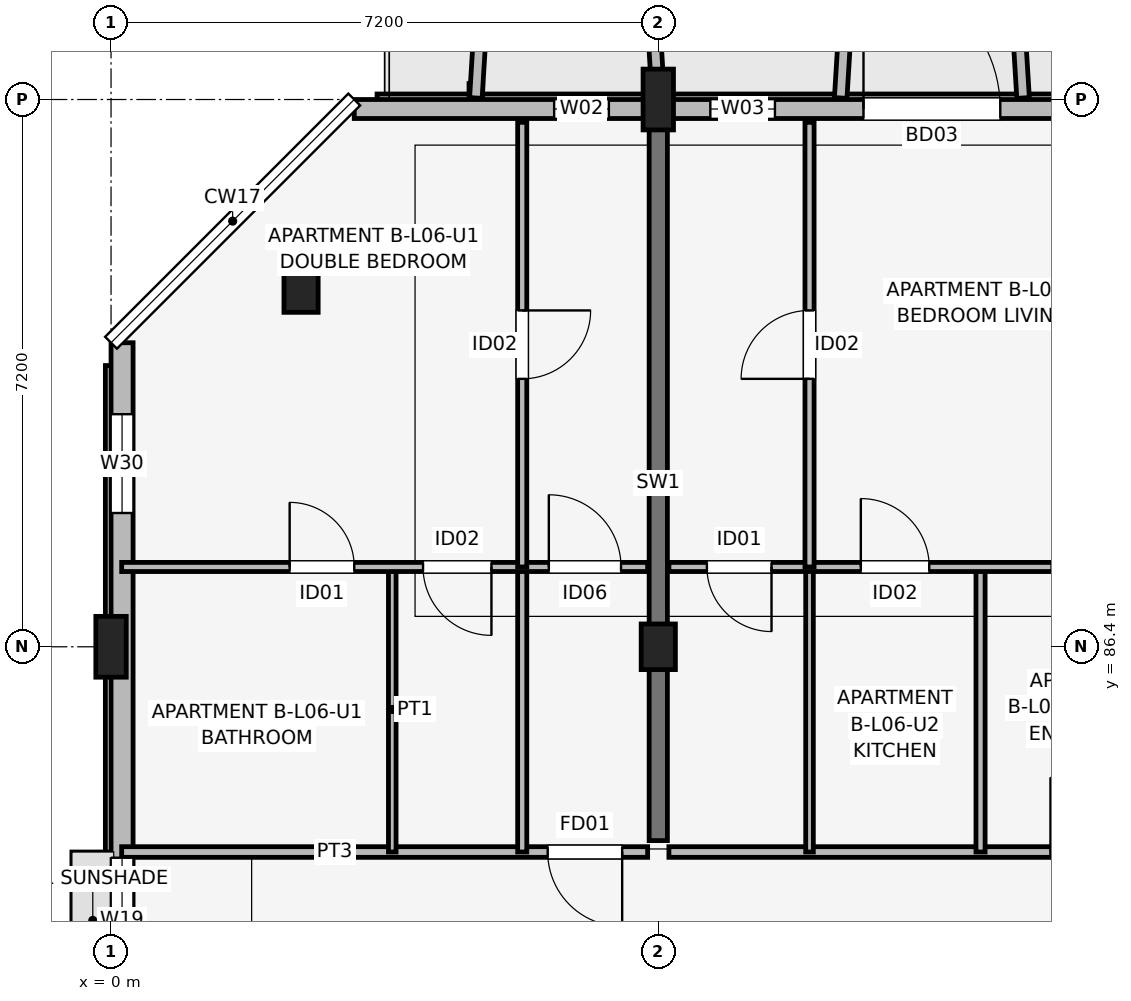
"""IFC4 building model, lengths in metres.
Left out: names, types, materials, properties, quantities, classifications, styles, units other than length and angle.
Written with IfcOpenShell. Run it as: python <this file> out.ifc"""

import sys

from ifc_helpers import new_model, si_unit, direction, frame, frame_2d, origin, origin_2d, place, context, subcontext, project, spatial, rectangle, extrude, element, fill, save


model = new_model("IFC4")
c1 = context("Model", 3, precision=1e-05, world=origin(), true_north=direction((0.0, 1.0)))
c2 = subcontext(c1, "Body", "Model", "MODEL_VIEW")
j1 = project(units=[si_unit("LENGTHUNIT", "METRE"), si_unit("PLANEANGLEUNIT", "RADIAN")], contexts=[c1])
p1 = place(None, origin())
s1 = spatial("IfcSite", under=j1, at=p1, CompositionType="ELEMENT")
p2 = place(p1, origin())
s2 = spatial("IfcBuilding", under=s1, at=p2, CompositionType="ELEMENT")
p3 = place(p2, frame((0.0, 0.0, 21.3)))
s3 = spatial("IfcBuildingStorey", under=s2, at=p3, CompositionType="ELEMENT", Elevation=21.3)
p4 = place(p3, frame((0.0, 86.4, 0.0), z_axis=(0.0, 0.0, 1.0), x_axis=(1.0, 0.0, 0.0)))
e1 = element("IfcColumn", 1, at=p4, inside=s3, PredefinedType="COLUMN", context=c2, shape_type="SweptSolid", body=[
    extrude(rectangle(XDim=0.4, YDim=0.8, at=origin_2d()), origin(), (0.0, 0.0, 1.0), 3.15),
])
for number, where, z_axis, x_axis in (
    (2, (2.5, 91.1, 0.0), (0.0, 0.0, 1.0), (1.0, 0.0, 0.0)),
    (3, (7.2, 86.4, 0.0), (0.0, 0.0, 1.0), (1.0, 0.0, 0.0)),
):
    element("IfcColumn", number, at=place(p3, frame(where, z_axis=z_axis, x_axis=x_axis)), inside=s3, PredefinedType="COLUMN", context=c2, shape_type="SweptSolid", body=[
        extrude(rectangle(XDim=0.45, YDim=0.6, at=origin_2d()), origin(), (0.0, 0.0, 1.0), 3.15),
    ])
p5 = place(p3, frame((7.2, 93.6, 0.0), z_axis=(0.0, 0.0, 1.0), x_axis=(1.0, 0.0, 0.0)))
e4 = element("IfcColumn", 4, at=p5, inside=s3, PredefinedType="COLUMN", context=c2, shape_type="SweptSolid", body=[
    extrude(rectangle(XDim=0.4, YDim=0.8, at=origin_2d()), origin(), (0.0, 0.0, 1.0), 3.15),
])
p6 = place(p3, frame((7.2, 83.85, 0.0), z_axis=(0.0, 0.0, 1.0), x_axis=(0.0, 1.0, 0.0)))
e5 = element("IfcWall", 5, at=p6, inside=s3, PredefinedType="SHEAR", context=c2, shape_type="SweptSolid", body=[
    extrude(rectangle(XDim=9.4, YDim=0.24, at=frame_2d((4.7, 0.0))), origin(), (0.0, 0.0, 1.0), 3.15),
])
p7 = place(p3, frame((32.8, 93.475, 0.0), z_axis=(0.0, 0.0, 1.0), x_axis=(-1.0, 0.0, 0.0)))
e6 = element("IfcWall", 6, at=p7, inside=s3, PredefinedType="SOLIDWALL", context=c2, shape_type="SweptSolid", body=[
    extrude(rectangle(XDim=29.6, YDim=0.25, at=frame_2d((14.8, 0.0))), origin(), (0.0, 0.0, 1.0), 2.43),
])
p8 = place(p7, frame((22.9, 0.0, 0.0), z_axis=(0.0, 0.0, 1.0), x_axis=(-1.0, 0.0, 0.0)))
e7 = element("IfcOpeningElement", 7, at=p8, cuts=e6, PredefinedType="OPENING", context=c2, shape_type="SweptSolid", body=[
    extrude(rectangle(XDim=1.8, YDim=2.15, at=frame_2d((0.9, 1.075))), frame((0.0, 0.135, 0.0), z_axis=(0.0, -1.0, 0.0), x_axis=(1.0, 0.0, 0.0)), (0.0, 0.0, 1.0), 0.27),
])
p9 = place(p7, frame((8.425, 0.0, 0.0), z_axis=(0.0, 0.0, 1.0), x_axis=(-1.0, 0.0, 0.0)))
e8 = element("IfcOpeningElement", 8, at=p9, cuts=e6, PredefinedType="OPENING", context=c2, shape_type="SweptSolid", body=[
    extrude(rectangle(XDim=1.65, YDim=2.15, at=frame_2d((0.825, 1.075))), frame((0.0, 0.135, 0.0), z_axis=(0.0, -1.0, 0.0), x_axis=(1.0, 0.0, 0.0)), (0.0, 0.0, 1.0), 0.27),
])
p10 = place(p7, frame((26.25, 0.0, 0.75)))
e9 = element("IfcOpeningElement", 9, at=p10, cuts=e6, PredefinedType="OPENING", context=c2, shape_type="SweptSolid", body=[
    extrude(rectangle(XDim=0.72, YDim=1.35, at=frame_2d((0.36, 0.675))), frame((0.0, 0.135, 0.0), z_axis=(0.0, -1.0, 0.0), x_axis=(1.0, 0.0, 0.0)), (0.0, 0.0, 1.0), 0.27),
])
p11 = place(p7, frame((24.065, 0.0, 0.75)))
e10 = element("IfcOpeningElement", 10, at=p11, cuts=e6, PredefinedType="OPENING", context=c2, shape_type="SweptSolid", body=[
    extrude(rectangle(XDim=0.85, YDim=1.4, at=frame_2d((0.425, 0.7))), frame((0.0, 0.135, 0.0), z_axis=(0.0, -1.0, 0.0), x_axis=(1.0, 0.0, 0.0)), (0.0, 0.0, 1.0), 0.27),
])
p12 = place(p7, frame((16.675, 0.0, 0.75)))
e11 = element("IfcOpeningElement", 11, at=p12, cuts=e6, PredefinedType="OPENING", context=c2, shape_type="SweptSolid", body=[
    extrude(rectangle(XDim=0.98, YDim=1.45, at=frame_2d((0.49, 0.725))), frame((0.0, 0.135, 0.0), z_axis=(0.0, -1.0, 0.0), x_axis=(1.0, 0.0, 0.0)), (0.0, 0.0, 1.0), 0.27),
])
p13 = place(p7, frame((13.725, 0.0, 0.67)))
e12 = element("IfcOpeningElement", 12, at=p13, cuts=e6, PredefinedType="OPENING", context=c2, shape_type="SweptSolid", body=[
    extrude(rectangle(XDim=2.15, YDim=1.65, at=frame_2d((1.075, 0.825))), frame((0.0, 0.135, 0.0), z_axis=(0.0, -1.0, 0.0), x_axis=(1.0, 0.0, 0.0)), (0.0, 0.0, 1.0), 0.27),
])
p14 = place(p7, frame((9.355, 0.0, 0.75)))
e13 = element("IfcOpeningElement", 13, at=p14, cuts=e6, PredefinedType="OPENING", context=c2, shape_type="SweptSolid", body=[
    extrude(rectangle(XDim=1.22, YDim=1.5, at=frame_2d((0.61, 0.75))), frame((0.0, 0.135, 0.0), z_axis=(0.0, -1.0, 0.0), x_axis=(1.0, 0.0, 0.0)), (0.0, 0.0, 1.0), 0.27),
])
p15 = place(p7, frame((1.89, 0.0, 0.7)))
e14 = element("IfcOpeningElement", 14, at=p15, cuts=e6, PredefinedType="OPENING", context=c2, shape_type="SweptSolid", body=[
    extrude(rectangle(XDim=1.58, YDim=1.6, at=frame_2d((0.79, 0.8))), frame((0.0, 0.135, 0.0), z_axis=(0.0, -1.0, 0.0), x_axis=(1.0, 0.0, 0.0)), (0.0, 0.0, 1.0), 0.27),
])
p16 = place(p3, frame((0.145, 90.4, 0.0), z_axis=(0.0, 0.0, 1.0), x_axis=(0.0, -1.0, 0.0)))
e15 = element("IfcWall", 15, at=p16, inside=s3, PredefinedType="SOLIDWALL", context=c2, shape_type="SweptSolid", body=[
    extrude(rectangle(XDim=15.2, YDim=0.29, at=frame_2d((7.6, 0.0))), origin(), (0.0, 0.0, 1.0), 2.43),
])
p17 = place(p16, frame((6.775, 0.0, 1.05)))
e16 = element("IfcOpeningElement", 16, at=p17, cuts=e15, PredefinedType="OPENING", context=c2, shape_type="SweptSolid", body=[
    extrude(rectangle(XDim=1.65, YDim=1.15, at=frame_2d((0.825, 0.575))), frame((0.0, 0.155, 0.0), z_axis=(0.0, -1.0, 0.0), x_axis=(1.0, 0.0, 0.0)), (0.0, 0.0, 1.0), 0.31),
])
p18 = place(p16, frame((0.94, 0.0, 0.75)))
e17 = element("IfcOpeningElement", 17, at=p18, cuts=e15, PredefinedType="OPENING", context=c2, shape_type="SweptSolid", body=[
    extrude(rectangle(XDim=1.3, YDim=1.55, at=frame_2d((0.65, 0.775))), frame((0.0, 0.155, 0.0), z_axis=(0.0, -1.0, 0.0), x_axis=(1.0, 0.0, 0.0)), (0.0, 0.0, 1.0), 0.31),
])
for number, where, z_axis, x_axis in (
    (18, (4.8, 93.62, 0.0), (0.0, 0.0, 1.0), (0.061, 0.998, 0.0)),
    (19, (7.2, 93.62, 0.0), (0.0, 0.0, 1.0), (-0.061, 0.998, 0.0)),
):
    element("IfcWall", number, at=place(p3, frame(where, z_axis=z_axis, x_axis=x_axis)), inside=s3, PredefinedType="ELEMENTEDWALL", context=c2, shape_type="SweptSolid", body=[
        extrude(rectangle(XDim=1.964, YDim=0.165, at=frame_2d((0.982, 0.0))), origin(), (0.0, 0.0, 1.0), 2.95),
    ])
for number, where, z_axis, x_axis in (
    (20, (9.6, 93.62, 0.0), (0.0, 0.0, 1.0), (0.061, 0.998, 0.0)),
    (21, (12.0, 93.62, 0.0), (0.0, 0.0, 1.0), (-0.061, 0.998, 0.0)),
):
    element("IfcWall", number, at=place(p3, frame(where, z_axis=z_axis, x_axis=x_axis)), inside=s3, PredefinedType="ELEMENTEDWALL", context=c2, shape_type="SweptSolid", body=[
        extrude(rectangle(XDim=1.964, YDim=0.165, at=frame_2d((0.982, 0.0))), origin(), (0.0, 0.0, 1.0), 2.48),
    ])
p19 = place(p3, frame((0.14, 83.7, 0.0), z_axis=(0.0, 0.0, 1.0), x_axis=(1.0, 0.0, 0.0)))
e22 = element("IfcWall", 22, at=p19, inside=s3, PredefinedType="PARTITIONING", context=c2, shape_type="SweptSolid", body=[
    extrude(rectangle(XDim=6.92, YDim=0.14, at=frame_2d((3.46, 0.0))), origin(), (0.0, 0.0, 1.0), 2.38),
])
p20 = place(p19, frame((6.585, 0.0, 0.0), z_axis=(0.0, 0.0, 1.0), x_axis=(-1.0, 0.0, 0.0)))
e23 = element("IfcOpeningElement", 23, at=p20, cuts=e22, PredefinedType="OPENING", context=c2, shape_type="SweptSolid", body=[
    extrude(rectangle(XDim=0.98, YDim=2.1, at=frame_2d((0.49, 1.05))), frame((0.0, 0.08, 0.0), z_axis=(0.0, -1.0, 0.0), x_axis=(1.0, 0.0, 0.0)), (0.0, 0.0, 1.0), 0.16),
])
p21 = place(p3, frame((3.7, 83.7, 0.0), z_axis=(0.0, 0.0, 1.0), x_axis=(0.0, 1.0, 0.0)))
e24 = element("IfcWall", 24, at=p21, inside=s3, PredefinedType="PARTITIONING", context=c2, shape_type="SweptSolid", body=[
    extrude(rectangle(XDim=3.75, YDim=0.1, at=frame_2d((1.875, 0.0))), origin(), (0.0, 0.0, 1.0), 2.38),
])
p22 = place(p3, frame((5.41, 83.7, 0.0), z_axis=(0.0, 0.0, 1.0), x_axis=(0.0, 1.0, 0.0)))
e25 = element("IfcWall", 25, at=p22, inside=s3, PredefinedType="PARTITIONING", context=c2, shape_type="SweptSolid", body=[
    extrude(rectangle(XDim=3.75, YDim=0.12, at=frame_2d((1.875, 0.0))), origin(), (0.0, 0.0, 1.0), 2.38),
])
p23 = place(p3, frame((0.14, 87.45, 0.0), z_axis=(0.0, 0.0, 1.0), x_axis=(1.0, 0.0, 0.0)))
e26 = element("IfcWall", 26, at=p23, inside=s3, PredefinedType="PARTITIONING", context=c2, shape_type="SweptSolid", body=[
    extrude(rectangle(XDim=6.92, YDim=0.12, at=frame_2d((3.46, 0.0))), origin(), (0.0, 0.0, 1.0), 2.38),
])
p24 = place(p23, frame((2.21, 0.0, 0.0)))
e27 = element("IfcOpeningElement", 27, at=p24, cuts=e26, PredefinedType="OPENING", context=c2, shape_type="SweptSolid", body=[
    extrude(rectangle(XDim=0.85, YDim=2.08, at=frame_2d((0.425, 1.04))), frame((0.0, 0.07, 0.0), z_axis=(0.0, -1.0, 0.0), x_axis=(1.0, 0.0, 0.0)), (0.0, 0.0, 1.0), 0.14),
])
p25 = place(p23, frame((4.865, 0.0, 0.0), z_axis=(0.0, 0.0, 1.0), x_axis=(-1.0, 0.0, 0.0)))
e28 = element("IfcOpeningElement", 28, at=p25, cuts=e26, PredefinedType="OPENING", context=c2, shape_type="SweptSolid", body=[
    extrude(rectangle(XDim=0.9, YDim=2.08, at=frame_2d((0.45, 1.04))), frame((0.0, 0.07, 0.0), z_axis=(0.0, -1.0, 0.0), x_axis=(1.0, 0.0, 0.0)), (0.0, 0.0, 1.0), 0.14),
])
p26 = place(p23, frame((5.62, 0.0, 0.0)))
e29 = element("IfcOpeningElement", 29, at=p26, cuts=e26, PredefinedType="OPENING", context=c2, shape_type="SweptSolid", body=[
    extrude(rectangle(XDim=0.95, YDim=2.08, at=frame_2d((0.475, 1.04))), frame((0.0, 0.07, 0.0), z_axis=(0.0, -1.0, 0.0), x_axis=(1.0, 0.0, 0.0)), (0.0, 0.0, 1.0), 0.14),
])
p27 = place(p3, frame((5.41, 87.45, 0.0), z_axis=(0.0, 0.0, 1.0), x_axis=(0.0, 1.0, 0.0)))
e30 = element("IfcWall", 30, at=p27, inside=s3, PredefinedType="PARTITIONING", context=c2, shape_type="SweptSolid", body=[
    extrude(rectangle(XDim=5.85, YDim=0.12, at=frame_2d((2.925, 0.0))), origin(), (0.0, 0.0, 1.0), 2.38),
])
p28 = place(p27, frame((3.375, 0.0, 0.0), z_axis=(0.0, 0.0, 1.0), x_axis=(-1.0, 0.0, 0.0)))
e31 = element("IfcOpeningElement", 31, at=p28, cuts=e30, PredefinedType="OPENING", context=c2, shape_type="SweptSolid", body=[
    extrude(rectangle(XDim=0.9, YDim=2.08, at=frame_2d((0.45, 1.04))), frame((0.0, 0.07, 0.0), z_axis=(0.0, -1.0, 0.0), x_axis=(1.0, 0.0, 0.0)), (0.0, 0.0, 1.0), 0.14),
])
p29 = place(p3, frame((7.34, 83.7, 0.0), z_axis=(0.0, 0.0, 1.0), x_axis=(1.0, 0.0, 0.0)))
e32 = element("IfcWall", 32, at=p29, inside=s3, PredefinedType="PARTITIONING", context=c2, shape_type="SweptSolid", body=[
    extrude(rectangle(XDim=6.92, YDim=0.14, at=frame_2d((3.46, 0.0))), origin(), (0.0, 0.0, 1.0), 2.38),
])
p30 = place(p29, frame((5.02, 0.0, 0.0)))
e33 = element("IfcOpeningElement", 33, at=p30, cuts=e32, PredefinedType="OPENING", context=c2, shape_type="SweptSolid", body=[
    extrude(rectangle(XDim=0.98, YDim=2.1, at=frame_2d((0.49, 1.05))), frame((0.0, 0.08, 0.0), z_axis=(0.0, -1.0, 0.0), x_axis=(1.0, 0.0, 0.0)), (0.0, 0.0, 1.0), 0.16),
])
p31 = place(p3, frame((9.19, 83.7, 0.0), z_axis=(0.0, 0.0, 1.0), x_axis=(0.0, 1.0, 0.0)))
e34 = element("IfcWall", 34, at=p31, inside=s3, PredefinedType="PARTITIONING", context=c2, shape_type="SweptSolid", body=[
    extrude(rectangle(XDim=3.75, YDim=0.1, at=frame_2d((1.875, 0.0))), origin(), (0.0, 0.0, 1.0), 2.38),
])
p32 = place(p3, frame((11.44, 83.7, 0.0), z_axis=(0.0, 0.0, 1.0), x_axis=(0.0, 1.0, 0.0)))
e35 = element("IfcWall", 35, at=p32, inside=s3, PredefinedType="PARTITIONING", context=c2, shape_type="SweptSolid", body=[
    extrude(rectangle(XDim=3.75, YDim=0.12, at=frame_2d((1.875, 0.0))), origin(), (0.0, 0.0, 1.0), 2.38),
])
p33 = place(p3, frame((7.34, 87.45, 0.0), z_axis=(0.0, 0.0, 1.0), x_axis=(1.0, 0.0, 0.0)))
e36 = element("IfcWall", 36, at=p33, inside=s3, PredefinedType="PARTITIONING", context=c2, shape_type="SweptSolid", body=[
    extrude(rectangle(XDim=6.92, YDim=0.12, at=frame_2d((3.46, 0.0))), origin(), (0.0, 0.0, 1.0), 2.38),
])
p34 = place(p33, frame((1.35, 0.0, 0.0), z_axis=(0.0, 0.0, 1.0), x_axis=(-1.0, 0.0, 0.0)))
e37 = element("IfcOpeningElement", 37, at=p34, cuts=e36, PredefinedType="OPENING", context=c2, shape_type="SweptSolid", body=[
    extrude(rectangle(XDim=0.85, YDim=2.08, at=frame_2d((0.425, 1.04))), frame((0.0, 0.07, 0.0), z_axis=(0.0, -1.0, 0.0), x_axis=(1.0, 0.0, 0.0)), (0.0, 0.0, 1.0), 0.14),
])
p35 = place(p33, frame((2.525, 0.0, 0.0)))
e38 = element("IfcOpeningElement", 38, at=p35, cuts=e36, PredefinedType="OPENING", context=c2, shape_type="SweptSolid", body=[
    extrude(rectangle(XDim=0.9, YDim=2.08, at=frame_2d((0.45, 1.04))), frame((0.0, 0.07, 0.0), z_axis=(0.0, -1.0, 0.0), x_axis=(1.0, 0.0, 0.0)), (0.0, 0.0, 1.0), 0.14),
])
p36 = place(p33, frame((5.985, 0.0, 0.0), z_axis=(0.0, 0.0, 1.0), x_axis=(-1.0, 0.0, 0.0)))
e39 = element("IfcOpeningElement", 39, at=p36, cuts=e36, PredefinedType="OPENING", context=c2, shape_type="SweptSolid", body=[
    extrude(rectangle(XDim=0.95, YDim=2.08, at=frame_2d((0.475, 1.04))), frame((0.0, 0.07, 0.0), z_axis=(0.0, -1.0, 0.0), x_axis=(1.0, 0.0, 0.0)), (0.0, 0.0, 1.0), 0.14),
])
p37 = place(p3, frame((9.19, 87.45, 0.0), z_axis=(0.0, 0.0, 1.0), x_axis=(0.0, 1.0, 0.0)))
e40 = element("IfcWall", 40, at=p37, inside=s3, PredefinedType="PARTITIONING", context=c2, shape_type="SweptSolid", body=[
    extrude(rectangle(XDim=5.85, YDim=0.12, at=frame_2d((2.925, 0.0))), origin(), (0.0, 0.0, 1.0), 2.38),
])
p38 = place(p37, frame((2.475, 0.0, 0.0)))
e41 = element("IfcOpeningElement", 41, at=p38, cuts=e40, PredefinedType="OPENING", context=c2, shape_type="SweptSolid", body=[
    extrude(rectangle(XDim=0.9, YDim=2.08, at=frame_2d((0.45, 1.04))), frame((0.0, 0.07, 0.0), z_axis=(0.0, -1.0, 0.0), x_axis=(1.0, 0.0, 0.0)), (0.0, 0.0, 1.0), 0.14),
])
p39 = place(p8, origin())
e42 = element("IfcDoor", 42, at=p39, inside=s3, OperationType="SINGLE_SWING_RIGHT", PredefinedType="DOOR", context=c2, shape_type="SweptSolid", body=[
    extrude(rectangle(XDim=1.8, YDim=2.15, at=frame_2d((0.9, 1.075))), frame((0.0, 0.025, 0.0), z_axis=(0.0, -1.0, 0.0), x_axis=(1.0, 0.0, 0.0)), (0.0, 0.0, 1.0), 0.05),
])
fill(e7, e42)
p40 = place(p10, origin())
e43 = element("IfcWindow", 43, at=p40, inside=s3, PartitioningType="SINGLE_PANEL", PredefinedType="WINDOW", context=c2, shape_type="SweptSolid", body=[
    extrude(rectangle(XDim=0.72, YDim=1.35, at=frame_2d((0.36, 0.675))), frame((0.0, 0.03, 0.0), z_axis=(0.0, -1.0, 0.0), x_axis=(1.0, 0.0, 0.0)), (0.0, 0.0, 1.0), 0.06),
])
fill(e9, e43)
p41 = place(p11, origin())
e44 = element("IfcWindow", 44, at=p41, inside=s3, PartitioningType="SINGLE_PANEL", PredefinedType="WINDOW", context=c2, shape_type="SweptSolid", body=[
    extrude(rectangle(XDim=0.85, YDim=1.4, at=frame_2d((0.425, 0.7))), frame((0.0, 0.03, 0.0), z_axis=(0.0, -1.0, 0.0), x_axis=(1.0, 0.0, 0.0)), (0.0, 0.0, 1.0), 0.06),
])
fill(e10, e44)
p42 = place(p17, origin())
e45 = element("IfcWindow", 45, at=p42, inside=s3, PartitioningType="SINGLE_PANEL", PredefinedType="WINDOW", context=c2, shape_type="SweptSolid", body=[
    extrude(rectangle(XDim=1.65, YDim=1.15, at=frame_2d((0.825, 0.575))), frame((0.0, 0.03, 0.0), z_axis=(0.0, -1.0, 0.0), x_axis=(1.0, 0.0, 0.0)), (0.0, 0.0, 1.0), 0.06),
])
fill(e16, e45)
p43 = place(p18, origin())
e46 = element("IfcWindow", 46, at=p43, inside=s3, PartitioningType="SINGLE_PANEL", PredefinedType="WINDOW", context=c2, shape_type="SweptSolid", body=[
    extrude(rectangle(XDim=1.3, YDim=1.55, at=frame_2d((0.65, 0.775))), frame((0.0, 0.03, 0.0), z_axis=(0.0, -1.0, 0.0), x_axis=(1.0, 0.0, 0.0)), (0.0, 0.0, 1.0), 0.06),
])
fill(e17, e46)
p44 = place(p20, origin())
e47 = element("IfcDoor", 47, at=p44, inside=s3, OperationType="SINGLE_SWING_RIGHT", PredefinedType="DOOR", context=c2, shape_type="SweptSolid", body=[
    extrude(rectangle(XDim=0.98, YDim=2.1, at=frame_2d((0.49, 1.05))), frame((0.0, 0.025, 0.0), z_axis=(0.0, -1.0, 0.0), x_axis=(1.0, 0.0, 0.0)), (0.0, 0.0, 1.0), 0.05),
])
fill(e23, e47)
p45 = place(p24, origin())
e48 = element("IfcDoor", 48, at=p45, inside=s3, OperationType="SINGLE_SWING_LEFT", PredefinedType="DOOR", context=c2, shape_type="SweptSolid", body=[
    extrude(rectangle(XDim=0.85, YDim=2.08, at=frame_2d((0.425, 1.04))), frame((0.0, 0.025, 0.0), z_axis=(0.0, -1.0, 0.0), x_axis=(1.0, 0.0, 0.0)), (0.0, 0.0, 1.0), 0.05),
])
fill(e27, e48)
p46 = place(p25, origin())
e49 = element("IfcDoor", 49, at=p46, inside=s3, OperationType="SINGLE_SWING_RIGHT", PredefinedType="DOOR", context=c2, shape_type="SweptSolid", body=[
    extrude(rectangle(XDim=0.9, YDim=2.08, at=frame_2d((0.45, 1.04))), frame((0.0, 0.025, 0.0), z_axis=(0.0, -1.0, 0.0), x_axis=(1.0, 0.0, 0.0)), (0.0, 0.0, 1.0), 0.05),
])
fill(e28, e49)
p47 = place(p26, origin())
e50 = element("IfcDoor", 50, at=p47, inside=s3, OperationType="SINGLE_SWING_LEFT", PredefinedType="DOOR", context=c2, shape_type="SweptSolid", body=[
    extrude(rectangle(XDim=0.95, YDim=2.08, at=frame_2d((0.475, 1.04))), frame((0.0, 0.025, 0.0), z_axis=(0.0, -1.0, 0.0), x_axis=(1.0, 0.0, 0.0)), (0.0, 0.0, 1.0), 0.05),
])
fill(e29, e50)
p48 = place(p28, origin())
e51 = element("IfcDoor", 51, at=p48, inside=s3, OperationType="SINGLE_SWING_RIGHT", PredefinedType="DOOR", context=c2, shape_type="SweptSolid", body=[
    extrude(rectangle(XDim=0.9, YDim=2.08, at=frame_2d((0.45, 1.04))), frame((0.0, 0.025, 0.0), z_axis=(0.0, -1.0, 0.0), x_axis=(1.0, 0.0, 0.0)), (0.0, 0.0, 1.0), 0.05),
])
fill(e31, e51)
p49 = place(p34, origin())
e52 = element("IfcDoor", 52, at=p49, inside=s3, OperationType="SINGLE_SWING_RIGHT", PredefinedType="DOOR", context=c2, shape_type="SweptSolid", body=[
    extrude(rectangle(XDim=0.85, YDim=2.08, at=frame_2d((0.425, 1.04))), frame((0.0, 0.025, 0.0), z_axis=(0.0, -1.0, 0.0), x_axis=(1.0, 0.0, 0.0)), (0.0, 0.0, 1.0), 0.05),
])
fill(e37, e52)
p50 = place(p35, origin())
e53 = element("IfcDoor", 53, at=p50, inside=s3, OperationType="SINGLE_SWING_LEFT", PredefinedType="DOOR", context=c2, shape_type="SweptSolid", body=[
    extrude(rectangle(XDim=0.9, YDim=2.08, at=frame_2d((0.45, 1.04))), frame((0.0, 0.025, 0.0), z_axis=(0.0, -1.0, 0.0), x_axis=(1.0, 0.0, 0.0)), (0.0, 0.0, 1.0), 0.05),
])
fill(e38, e53)
p51 = place(p38, origin())
e54 = element("IfcDoor", 54, at=p51, inside=s3, OperationType="SINGLE_SWING_LEFT", PredefinedType="DOOR", context=c2, shape_type="SweptSolid", body=[
    extrude(rectangle(XDim=0.9, YDim=2.08, at=frame_2d((0.45, 1.04))), frame((0.0, 0.025, 0.0), z_axis=(0.0, -1.0, 0.0), x_axis=(1.0, 0.0, 0.0)), (0.0, 0.0, 1.0), 0.05),
])
fill(e41, e54)
save(model, sys.argv[1])
